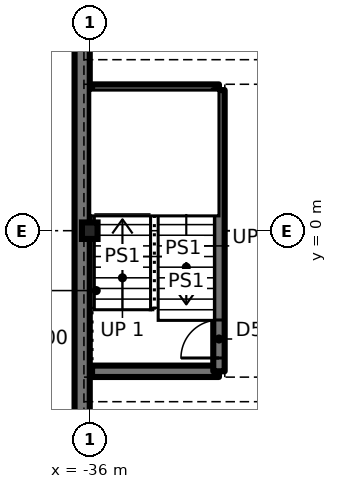
"""IFC4 building model, lengths in metres.
Left out: names, types, materials, properties, quantities, classifications, styles, units other than length and angle.
Written with IfcOpenShell. Run it as: python <this file> out.ifc"""

import sys

from ifc_helpers import new_model, si_unit, direction, frame, frame_2d, origin, origin_2d, place, context, subcontext, project, spatial, rectangle, i_section, extrude, element, fill, save


model = new_model("IFC4")
c1 = context("Model", 3, precision=1e-05, world=origin(), true_north=direction((0.0, 1.0)))
c2 = subcontext(c1, "Body", "Model", "MODEL_VIEW")
j1 = project(units=[si_unit("LENGTHUNIT", "METRE"), si_unit("PLANEANGLEUNIT", "RADIAN")], contexts=[c1])
p1 = place(None, origin())
s1 = spatial("IfcSite", under=j1, at=p1, CompositionType="ELEMENT")
p2 = place(p1, origin())
s2 = spatial("IfcBuilding", under=s1, at=p2, CompositionType="ELEMENT")
p3 = place(p2, frame((0.0, 0.0, -3.6)))
s3 = spatial("IfcBuildingStorey", under=s2, at=p3, CompositionType="ELEMENT", Elevation=-3.6)
p4 = place(p3, frame((-36.0, 0.0, 0.0), z_axis=(0.0, 0.0, 1.0), x_axis=(1.0, 0.0, 0.0)))
e1 = element("IfcColumn", 1, at=p4, inside=s3, PredefinedType="COLUMN", context=c2, shape_type="SweptSolid", body=[
    extrude(i_section(OverallWidth=0.411, OverallDepth=0.434, WebThickness=0.036, FlangeThickness=0.057, at=origin_2d()), origin(), (0.0, 0.0, 1.0), 3.6),
])
p5 = place(p3, frame((-36.2, 35.8, 0.0), z_axis=(0.0, 0.0, 1.0), x_axis=(0.0, -1.0, 0.0)))
e2 = element("IfcWall", 2, at=p5, inside=s3, PredefinedType="SOLIDWALL", context=c2, shape_type="SweptSolid", body=[
    extrude(rectangle(XDim=71.6, YDim=0.4, at=frame_2d((35.8, 0.0))), origin(), (0.0, 0.0, 1.0), 2.581),
])
for number, where, z_axis, x_axis in (
    (3, (-35.94, -3.7, 0.0), (0.0, 0.0, 1.0), (1.0, 0.0, 0.0)),
    (4, (-35.94, 3.7, 0.0), (0.0, 0.0, 1.0), (1.0, 0.0, 0.0)),
):
    element("IfcWall", number, at=place(p3, frame(where, z_axis=z_axis, x_axis=x_axis)), inside=s3, PredefinedType="SOLIDWALL", context=c2, shape_type="SweptSolid", body=[
        extrude(rectangle(XDim=3.34, YDim=0.3, at=frame_2d((1.67, 0.0))), origin(), (0.0, 0.0, 1.0), 3.6),
    ])
p6 = place(p3, frame((-32.6, -3.7, 0.0), z_axis=(0.0, 0.0, 1.0), x_axis=(0.0, 1.0, 0.0)))
e5 = element("IfcWall", 5, at=p6, inside=s3, PredefinedType="SOLIDWALL", context=c2, shape_type="SweptSolid", body=[
    extrude(rectangle(XDim=7.4, YDim=0.3, at=frame_2d((3.7, 0.0))), origin(), (0.0, 0.0, 1.0), 3.6),
])
p7 = place(p6, frame((0.35, 0.0, 0.0)))
e6 = element("IfcOpeningElement", 6, at=p7, cuts=e5, PredefinedType="OPENING", context=c2, shape_type="SweptSolid", body=[
    extrude(rectangle(XDim=1.0, YDim=2.1, at=frame_2d((0.5, 1.05))), frame((0.0, 0.16, 0.0), z_axis=(0.0, -1.0, 0.0), x_axis=(1.0, 0.0, 0.0)), (0.0, 0.0, 1.0), 0.32),
])
p8 = place(p7, origin())
e7 = element("IfcDoor", 7, at=p8, inside=s3, OperationType="SINGLE_SWING_LEFT", PredefinedType="DOOR", context=c2, shape_type="SweptSolid", body=[
    extrude(rectangle(XDim=1.0, YDim=2.1, at=frame_2d((0.5, 1.05))), frame((0.0, 0.025, 0.0), z_axis=(0.0, -1.0, 0.0), x_axis=(1.0, 0.0, 0.0)), (0.0, 0.0, 1.0), 0.05),
])
fill(e6, e7)
save(model, sys.argv[1])
